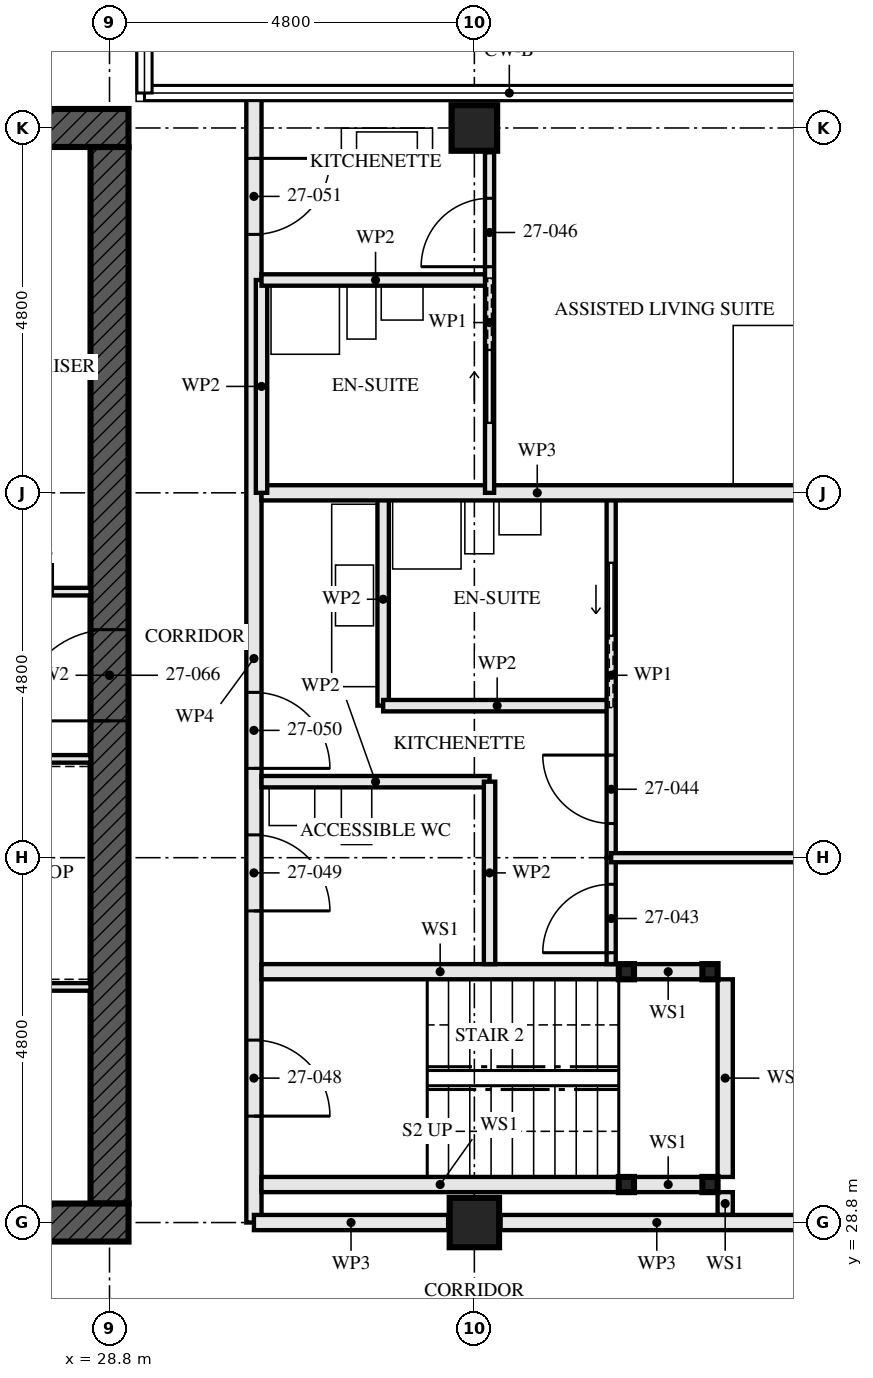
"""IFC4 building model, lengths in metres.
Left out: names, types, materials, properties, quantities, classifications, styles, units other than length and angle.
Written with IfcOpenShell. Run it as: python <this file> out.ifc"""

import sys

from ifc_helpers import new_model, si_unit, direction, frame, frame_2d, origin, origin_2d, place, context, subcontext, project, spatial, rectangle, hollow_rectangle, extrude, element, fill, save


model = new_model("IFC4")
c1 = context("Model", 3, precision=1e-05, world=origin(), true_north=direction((0.0, 1.0)))
c2 = subcontext(c1, "Body", "Model", "MODEL_VIEW")
j1 = project(units=[si_unit("LENGTHUNIT", "METRE"), si_unit("PLANEANGLEUNIT", "RADIAN")], contexts=[c1])
p1 = place(None, origin())
s1 = spatial("IfcSite", under=j1, at=p1, CompositionType="ELEMENT")
p2 = place(p1, origin())
s2 = spatial("IfcBuilding", under=s1, at=p2, CompositionType="ELEMENT")
p3 = place(p2, frame((0.0, 0.0, 101.5)))
s3 = spatial("IfcBuildingStorey", under=s2, at=p3, CompositionType="ELEMENT", Elevation=101.5)
p4 = place(p3, frame((33.6, 28.8, 0.0), z_axis=(0.0, 0.0, 1.0), x_axis=(0.0, 1.0, 0.0)))
e1 = element("IfcColumn", 1, at=p4, inside=s3, PredefinedType="COLUMN", context=c2, shape_type="SweptSolid", body=[
    extrude(hollow_rectangle(XDim=0.65, YDim=0.65, WallThickness=0.05, at=origin_2d()), origin(), (0.0, 0.0, 1.0), 3.5),
])
p5 = place(p3, frame((33.6, 43.2, 0.0), z_axis=(0.0, 0.0, 1.0), x_axis=(0.0, 1.0, 0.0)))
e2 = element("IfcColumn", 2, at=p5, inside=s3, PredefinedType="COLUMN", context=c2, shape_type="SweptSolid", body=[
    extrude(hollow_rectangle(XDim=0.6, YDim=0.6, WallThickness=0.08, at=origin_2d()), origin(), (0.0, 0.0, 1.0), 3.5),
])
p6 = place(p3, frame((14.15, 28.8, -0.17), z_axis=(0.0, 0.0, 1.0), x_axis=(1.0, 0.0, 0.0)))
e3 = element("IfcWall", 3, at=p6, inside=s3, PredefinedType="SHEAR", context=c2, shape_type="SweptSolid", body=[
    extrude(rectangle(XDim=14.9, YDim=0.5, at=frame_2d((7.45, 0.0))), origin(), (0.0, 0.0, 1.0), 3.5),
])
p7 = place(p6, frame((6.85, 0.0, 0.17)))
e4 = element("IfcOpeningElement", 4, at=p7, cuts=e3, PredefinedType="OPENING", context=c2, shape_type="SweptSolid", body=[
    extrude(rectangle(XDim=1.2, YDim=2.1, at=frame_2d((0.6, 1.05))), frame((0.0, 0.26, 0.0), z_axis=(0.0, -1.0, 0.0), x_axis=(1.0, 0.0, 0.0)), (0.0, 0.0, 1.0), 0.521),
])
p8 = place(p3, frame((29.05, 43.2, -0.17), z_axis=(0.0, 0.0, 1.0), x_axis=(-1.0, 0.0, 0.0)))
e5 = element("IfcWall", 5, at=p8, inside=s3, PredefinedType="SHEAR", context=c2, shape_type="SweptSolid", body=[
    extrude(rectangle(XDim=14.9, YDim=0.5, at=frame_2d((7.45, 0.0))), origin(), (0.0, 0.0, 1.0), 3.5),
])
p9 = place(p8, frame((6.85, 0.0, 0.17)))
e6 = element("IfcOpeningElement", 6, at=p9, cuts=e5, PredefinedType="OPENING", context=c2, shape_type="SweptSolid", body=[
    extrude(rectangle(XDim=1.2, YDim=2.1, at=frame_2d((0.6, 1.05))), frame((0.0, 0.26, 0.0), z_axis=(0.0, -1.0, 0.0), x_axis=(1.0, 0.0, 0.0)), (0.0, 0.0, 1.0), 0.521),
])
p10 = place(p3, frame((28.8, 29.05, -0.17), z_axis=(0.0, 0.0, 1.0), x_axis=(0.0, 1.0, 0.0)))
e7 = element("IfcWall", 7, at=p10, inside=s3, PredefinedType="SHEAR", context=c2, shape_type="SweptSolid", body=[
    extrude(rectangle(XDim=13.9, YDim=0.5, at=frame_2d((6.95, 0.0))), origin(), (0.0, 0.0, 1.0), 3.5),
])
p11 = place(p10, frame((6.35, 0.0, 0.17)))
e8 = element("IfcOpeningElement", 8, at=p11, cuts=e7, PredefinedType="OPENING", context=c2, shape_type="SweptSolid", body=[
    extrude(rectangle(XDim=1.2, YDim=2.1, at=frame_2d((0.6, 1.05))), frame((0.0, 0.26, 0.0), z_axis=(0.0, -1.0, 0.0), x_axis=(1.0, 0.0, 0.0)), (0.0, 0.0, 1.0), 0.521),
])
for number, where, z_axis, x_axis in (
    (9, (36.7, 29.3, 0.0), (0.0, 0.0, 1.0), (1.0, 0.0, 0.0)),
    (10, (36.7, 32.1, 0.0), (0.0, 0.0, 1.0), (1.0, 0.0, 0.0)),
    (11, (35.6, 29.3, 0.0), (0.0, 0.0, 1.0), (1.0, 0.0, 0.0)),
    (12, (35.6, 32.1, 0.0), (0.0, 0.0, 1.0), (1.0, 0.0, 0.0)),
):
    element("IfcColumn", number, at=place(p3, frame(where, z_axis=z_axis, x_axis=x_axis)), inside=s3, PredefinedType="COLUMN", context=c2, shape_type="SweptSolid", body=[
        extrude(hollow_rectangle(XDim=0.2, YDim=0.2, WallThickness=0.008, at=origin_2d()), origin(), (0.0, 0.0, 1.0), 3.33),
    ])
p12 = place(p3, frame((36.6, 29.3, 0.0), z_axis=(0.0, 0.0, 1.0), x_axis=(-1.0, 0.0, 0.0)))
e13 = element("IfcWall", 13, at=p12, inside=s3, PredefinedType="SOLIDWALL", context=c2, shape_type="SweptSolid", body=[
    extrude(rectangle(XDim=0.9, YDim=0.2, at=frame_2d((0.45, 0.0))), origin(), (0.0, 0.0, 1.0), 2.99),
])
p13 = place(p3, frame((35.5, 29.3, 0.0), z_axis=(0.0, 0.0, 1.0), x_axis=(-1.0, 0.0, 0.0)))
e14 = element("IfcWall", 14, at=p13, inside=s3, PredefinedType="SOLIDWALL", context=c2, shape_type="SweptSolid", body=[
    extrude(rectangle(XDim=4.7, YDim=0.2, at=frame_2d((2.35, 0.0))), origin(), (0.0, 0.0, 1.0), 2.99),
])
p14 = place(p3, frame((36.6, 32.1, 0.0), z_axis=(0.0, 0.0, 1.0), x_axis=(-1.0, 0.0, 0.0)))
e15 = element("IfcWall", 15, at=p14, inside=s3, PredefinedType="SOLIDWALL", context=c2, shape_type="SweptSolid", body=[
    extrude(rectangle(XDim=0.9, YDim=0.2, at=frame_2d((0.45, 0.0))), origin(), (0.0, 0.0, 1.0), 2.99),
])
p15 = place(p3, frame((35.5, 32.1, 0.0), z_axis=(0.0, 0.0, 1.0), x_axis=(-1.0, 0.0, 0.0)))
e16 = element("IfcWall", 16, at=p15, inside=s3, PredefinedType="SOLIDWALL", context=c2, shape_type="SweptSolid", body=[
    extrude(rectangle(XDim=4.7, YDim=0.2, at=frame_2d((2.35, 0.0))), origin(), (0.0, 0.0, 1.0), 2.99),
])
p16 = place(p3, frame((36.9, 28.9, 0.0), z_axis=(0.0, 0.0, 1.0), x_axis=(0.0, 1.0, 0.0)))
e17 = element("IfcWall", 17, at=p16, inside=s3, PredefinedType="SOLIDWALL", context=c2, shape_type="SweptSolid", body=[
    extrude(rectangle(XDim=0.3, YDim=0.2, at=frame_2d((0.15, 0.0))), origin(), (0.0, 0.0, 1.0), 3.33),
])
p17 = place(p3, frame((36.9, 29.4, 0.0), z_axis=(0.0, 0.0, 1.0), x_axis=(0.0, 1.0, 0.0)))
e18 = element("IfcWall", 18, at=p17, inside=s3, PredefinedType="SOLIDWALL", context=c2, shape_type="SweptSolid", body=[
    extrude(rectangle(XDim=2.6, YDim=0.2, at=frame_2d((1.3, 0.0))), origin(), (0.0, 0.0, 1.0), 3.33),
])
p18 = place(p3, frame((33.8, 32.2, 0.0), z_axis=(0.0, 0.0, 1.0), x_axis=(0.0, 1.0, 0.0)))
e19 = element("IfcWall", 19, at=p18, inside=s3, PredefinedType="PARTITIONING", context=c2, shape_type="SweptSolid", body=[
    extrude(rectangle(XDim=2.4, YDim=0.15, at=frame_2d((1.2, 0.0))), origin(), (0.0, 0.0, 1.0), 2.55),
])
for number, where, z_axis, x_axis in (
    (20, (33.8, 34.6, 0.0), (0.0, 0.0, 1.0), (-1.0, 0.0, 0.0)),
    (21, (35.4, 35.6, 0.0), (0.0, 0.0, 1.0), (-1.0, 0.0, 0.0)),
):
    element("IfcWall", number, at=place(p3, frame(where, z_axis=z_axis, x_axis=x_axis)), inside=s3, PredefinedType="PARTITIONING", context=c2, shape_type="SweptSolid", body=[
        extrude(rectangle(XDim=3.0, YDim=0.15, at=frame_2d((1.5, 0.0))), origin(), (0.0, 0.0, 1.0), 3.33),
    ])
p19 = place(p3, frame((32.4, 35.6, 0.0), z_axis=(0.0, 0.0, 1.0), x_axis=(0.0, 1.0, 0.0)))
e22 = element("IfcWall", 22, at=p19, inside=s3, PredefinedType="PARTITIONING", context=c2, shape_type="SweptSolid", body=[
    extrude(rectangle(XDim=2.8, YDim=0.15, at=frame_2d((1.4, 0.0))), origin(), (0.0, 0.0, 1.0), 3.33),
])
p20 = place(p3, frame((35.4, 32.2, 0.0), z_axis=(0.0, 0.0, 1.0), x_axis=(0.0, 1.0, 0.0)))
e23 = element("IfcWall", 23, at=p20, inside=s3, PredefinedType="PARTITIONING", context=c2, shape_type="SweptSolid", body=[
    extrude(rectangle(XDim=1.4, YDim=0.12, at=frame_2d((0.7, 0.0))), origin(), (0.0, 0.0, 1.0), 3.33),
])
p21 = place(p20, frame((0.15, 0.0, 0.0)))
e24 = element("IfcOpeningElement", 24, at=p21, cuts=e23, PredefinedType="OPENING", context=c2, shape_type="SweptSolid", body=[
    extrude(rectangle(XDim=0.9, YDim=2.1, at=frame_2d((0.45, 1.05))), frame((0.0, 0.071, 0.0), z_axis=(0.0, -1.0, 0.0), x_axis=(1.0, 0.0, 0.0)), (0.0, 0.0, 1.0), 0.141),
])
p22 = place(p3, frame((35.4, 33.6, 0.0), z_axis=(0.0, 0.0, 1.0), x_axis=(0.0, 1.0, 0.0)))
e25 = element("IfcWall", 25, at=p22, inside=s3, PredefinedType="PARTITIONING", context=c2, shape_type="SweptSolid", body=[
    extrude(rectangle(XDim=4.8, YDim=0.12, at=frame_2d((2.4, 0.0))), origin(), (0.0, 0.0, 1.0), 3.33),
])
p23 = place(p22, frame((0.45, 0.0, 0.0)))
e26 = element("IfcOpeningElement", 26, at=p23, cuts=e25, PredefinedType="OPENING", context=c2, shape_type="SweptSolid", body=[
    extrude(rectangle(XDim=0.9, YDim=2.1, at=frame_2d((0.45, 1.05))), frame((0.0, 0.071, 0.0), z_axis=(0.0, -1.0, 0.0), x_axis=(1.0, 0.0, 0.0)), (0.0, 0.0, 1.0), 0.141),
])
p24 = place(p22, frame((2.925, 0.0, 0.0)))
e27 = element("IfcOpeningElement", 27, at=p24, cuts=e25, PredefinedType="OPENING", context=c2, shape_type="SweptSolid", body=[
    extrude(rectangle(XDim=0.95, YDim=2.1, at=frame_2d((0.475, 1.05))), frame((0.0, 0.071, 0.0), z_axis=(0.0, -1.0, 0.0), x_axis=(1.0, 0.0, 0.0)), (0.0, 0.0, 1.0), 0.141),
])
p25 = place(p3, frame((42.855, 33.6, 0.0), z_axis=(0.0, 0.0, 1.0), x_axis=(-1.0, 0.0, 0.0)))
e28 = element("IfcWall", 28, at=p25, inside=s3, PredefinedType="PARTITIONING", context=c2, shape_type="SweptSolid", body=[
    extrude(rectangle(XDim=7.455, YDim=0.12, at=frame_2d((3.728, 0.0))), origin(), (0.0, 0.0, 1.0), 2.55),
])
p26 = place(p3, frame((38.055, 38.4, 0.0), z_axis=(0.0, 0.0, 1.0), x_axis=(-1.0, 0.0, 0.0)))
e29 = element("IfcWall", 29, at=p26, inside=s3, PredefinedType="PARTITIONING", context=c2, shape_type="SweptSolid", body=[
    extrude(rectangle(XDim=7.255, YDim=0.2, at=frame_2d((3.627, 0.0))), origin(), (0.0, 0.0, 1.0), 2.55),
])
p27 = place(p3, frame((33.8, 41.2, 0.0), z_axis=(0.0, 0.0, 1.0), x_axis=(-1.0, 0.0, 0.0)))
e30 = element("IfcWall", 30, at=p27, inside=s3, PredefinedType="PARTITIONING", context=c2, shape_type="SweptSolid", body=[
    extrude(rectangle(XDim=3.0, YDim=0.15, at=frame_2d((1.5, 0.0))), origin(), (0.0, 0.0, 1.0), 3.33),
])
p28 = place(p3, frame((30.8, 38.4, 0.0), z_axis=(0.0, 0.0, 1.0), x_axis=(0.0, 1.0, 0.0)))
e31 = element("IfcWall", 31, at=p28, inside=s3, PredefinedType="PARTITIONING", context=c2, shape_type="SweptSolid", body=[
    extrude(rectangle(XDim=2.8, YDim=0.15, at=frame_2d((1.4, 0.0))), origin(), (0.0, 0.0, 1.0), 3.33),
])
p29 = place(p3, frame((33.8, 38.4, 0.0), z_axis=(0.0, 0.0, 1.0), x_axis=(0.0, 1.0, 0.0)))
e32 = element("IfcWall", 32, at=p29, inside=s3, PredefinedType="PARTITIONING", context=c2, shape_type="SweptSolid", body=[
    extrude(rectangle(XDim=4.48, YDim=0.12, at=frame_2d((2.24, 0.0))), origin(), (0.0, 0.0, 1.0), 3.33),
])
p30 = place(p29, frame((2.975, 0.0, 0.0)))
e33 = element("IfcOpeningElement", 33, at=p30, cuts=e32, PredefinedType="OPENING", context=c2, shape_type="SweptSolid", body=[
    extrude(rectangle(XDim=0.9, YDim=2.1, at=frame_2d((0.45, 1.05))), frame((0.0, 0.071, 0.0), z_axis=(0.0, -1.0, 0.0), x_axis=(1.0, 0.0, 0.0)), (0.0, 0.0, 1.0), 0.141),
])
p31 = place(p29, frame((0.925, 0.0, 0.0)))
e34 = element("IfcOpeningElement", 34, at=p31, cuts=e32, PredefinedType="OPENING", context=c2, shape_type="SweptSolid", body=[
    extrude(rectangle(XDim=0.95, YDim=2.1, at=frame_2d((0.475, 1.05))), frame((0.0, 0.071, 0.0), z_axis=(0.0, -1.0, 0.0), x_axis=(1.0, 0.0, 0.0)), (0.0, 0.0, 1.0), 0.141),
])
p32 = place(p3, frame((30.7, 28.8, 0.0), z_axis=(0.0, 0.0, 1.0), x_axis=(0.0, 1.0, 0.0)))
e35 = element("IfcWall", 35, at=p32, inside=s3, PredefinedType="PARTITIONING", context=c2, shape_type="SweptSolid", body=[
    extrude(rectangle(XDim=14.84, YDim=0.2, at=frame_2d((7.42, 0.0))), origin(), (0.0, 0.0, 1.0), 2.32),
])
p33 = place(p32, frame((1.4, 0.0, 0.0)))
e36 = element("IfcOpeningElement", 36, at=p33, cuts=e35, PredefinedType="OPENING", context=c2, shape_type="SweptSolid", body=[
    extrude(rectangle(XDim=1.0, YDim=2.1, at=frame_2d((0.5, 1.05))), frame((0.0, 0.111, 0.0), z_axis=(0.0, -1.0, 0.0), x_axis=(1.0, 0.0, 0.0)), (0.0, 0.0, 1.0), 0.221),
])
p34 = place(p32, frame((4.1, 0.0, 0.0)))
e37 = element("IfcOpeningElement", 37, at=p34, cuts=e35, PredefinedType="OPENING", context=c2, shape_type="SweptSolid", body=[
    extrude(rectangle(XDim=1.0, YDim=2.1, at=frame_2d((0.5, 1.05))), frame((0.0, 0.111, 0.0), z_axis=(0.0, -1.0, 0.0), x_axis=(1.0, 0.0, 0.0)), (0.0, 0.0, 1.0), 0.221),
])
p35 = place(p32, frame((5.975, 0.0, 0.0)))
e38 = element("IfcOpeningElement", 38, at=p35, cuts=e35, PredefinedType="OPENING", context=c2, shape_type="SweptSolid", body=[
    extrude(rectangle(XDim=1.0, YDim=2.1, at=frame_2d((0.5, 1.05))), frame((0.0, 0.111, 0.0), z_axis=(0.0, -1.0, 0.0), x_axis=(1.0, 0.0, 0.0)), (0.0, 0.0, 1.0), 0.221),
])
p36 = place(p32, frame((13.0, 0.0, 0.0)))
e39 = element("IfcOpeningElement", 39, at=p36, cuts=e35, PredefinedType="OPENING", context=c2, shape_type="SweptSolid", body=[
    extrude(rectangle(XDim=1.0, YDim=2.1, at=frame_2d((0.5, 1.05))), frame((0.0, 0.111, 0.0), z_axis=(0.0, -1.0, 0.0), x_axis=(1.0, 0.0, 0.0)), (0.0, 0.0, 1.0), 0.221),
])
p37 = place(p3, frame((23.05, 34.9, 0.0), z_axis=(0.0, 0.0, 1.0), x_axis=(1.0, 0.0, 0.0)))
e40 = element("IfcWall", 40, at=p37, inside=s3, PredefinedType="SOLIDWALL", context=c2, shape_type="SweptSolid", body=[
    extrude(rectangle(XDim=5.5, YDim=0.1, at=frame_2d((2.75, 0.0))), origin(), (0.0, 0.0, 1.0), 3.33),
])
p38 = place(p3, frame((22.65, 37.1, 0.0), z_axis=(0.0, 0.0, 1.0), x_axis=(1.0, 0.0, 0.0)))
e41 = element("IfcWall", 41, at=p38, inside=s3, PredefinedType="SOLIDWALL", context=c2, shape_type="SweptSolid", body=[
    extrude(rectangle(XDim=5.9, YDim=0.1, at=frame_2d((2.95, 0.0))), origin(), (0.0, 0.0, 1.0), 3.33),
])
p39 = place(p38, frame((3.15, 0.0, 0.0)))
e42 = element("IfcOpeningElement", 42, at=p39, cuts=e41, PredefinedType="OPENING", context=c2, shape_type="SweptSolid", body=[
    extrude(rectangle(XDim=0.9, YDim=2.1, at=frame_2d((0.45, 1.05))), frame((0.0, 0.061, 0.0), z_axis=(0.0, -1.0, 0.0), x_axis=(1.0, 0.0, 0.0)), (0.0, 0.0, 1.0), 0.121),
])
p40 = place(p38, frame((4.7, 0.0, 0.0)))
e43 = element("IfcOpeningElement", 43, at=p40, cuts=e41, PredefinedType="OPENING", context=c2, shape_type="SweptSolid", body=[
    extrude(rectangle(XDim=0.7, YDim=2.1, at=frame_2d((0.35, 1.05))), frame((0.0, 0.061, 0.0), z_axis=(0.0, -1.0, 0.0), x_axis=(1.0, 0.0, 0.0)), (0.0, 0.0, 1.0), 0.121),
])
p41 = place(p3, frame((23.15, 31.9, 0.0), z_axis=(0.0, 0.0, 1.0), x_axis=(1.0, 0.0, 0.0)))
e44 = element("IfcWall", 44, at=p41, inside=s3, PredefinedType="SOLIDWALL", context=c2, shape_type="SweptSolid", body=[
    extrude(rectangle(XDim=5.4, YDim=0.1, at=frame_2d((2.7, 0.0))), origin(), (0.0, 0.0, 1.0), 3.33),
])
p42 = place(p3, frame((38.055, 28.8, 0.0), z_axis=(0.0, 0.0, 1.0), x_axis=(-1.0, 0.0, 0.0)))
e45 = element("IfcWall", 45, at=p42, inside=s3, PredefinedType="PARTITIONING", context=c2, shape_type="SweptSolid", body=[
    extrude(rectangle(XDim=4.11, YDim=0.2, at=frame_2d((2.055, 0.0))), origin(), (0.0, 0.0, 1.0), 2.32),
])
p43 = place(p3, frame((33.255, 28.8, 0.0), z_axis=(0.0, 0.0, 1.0), x_axis=(-1.0, 0.0, 0.0)))
e46 = element("IfcWall", 46, at=p43, inside=s3, PredefinedType="PARTITIONING", context=c2, shape_type="SweptSolid", body=[
    extrude(rectangle(XDim=2.555, YDim=0.2, at=frame_2d((1.277, 0.0))), origin(), (0.0, 0.0, 1.0), 2.32),
])
p44 = place(p21, origin())
e47 = element("IfcDoor", 47, at=p44, inside=s3, OperationType="SINGLE_SWING_RIGHT", PredefinedType="DOOR", context=c2, shape_type="SweptSolid", body=[
    extrude(rectangle(XDim=0.9, YDim=2.1, at=frame_2d((0.45, 1.05))), frame((0.0, 0.022, 0.0), z_axis=(0.0, -1.0, 0.0), x_axis=(1.0, 0.0, 0.0)), (0.0, 0.0, 1.0), 0.044),
])
fill(e24, e47)
p45 = place(p23, origin())
e48 = element("IfcDoor", 48, at=p45, inside=s3, OperationType="SINGLE_SWING_LEFT", PredefinedType="DOOR", context=c2, shape_type="SweptSolid", body=[
    extrude(rectangle(XDim=0.9, YDim=2.1, at=frame_2d((0.45, 1.05))), frame((0.0, 0.022, 0.0), z_axis=(0.0, -1.0, 0.0), x_axis=(1.0, 0.0, 0.0)), (0.0, 0.0, 1.0), 0.044),
])
fill(e26, e48)
p46 = place(p24, origin())
e49 = element("IfcDoor", 49, at=p46, inside=s3, OperationType="SLIDING_TO_RIGHT", PredefinedType="DOOR", context=c2, shape_type="SweptSolid", body=[
    extrude(rectangle(XDim=0.95, YDim=2.1, at=frame_2d((0.475, 1.05))), frame((0.0, 0.022, 0.0), z_axis=(0.0, -1.0, 0.0), x_axis=(1.0, 0.0, 0.0)), (0.0, 0.0, 1.0), 0.044),
])
fill(e27, e49)
p47 = place(p30, origin())
e50 = element("IfcDoor", 50, at=p47, inside=s3, OperationType="SINGLE_SWING_RIGHT", PredefinedType="DOOR", context=c2, shape_type="SweptSolid", body=[
    extrude(rectangle(XDim=0.9, YDim=2.1, at=frame_2d((0.45, 1.05))), frame((0.0, 0.022, 0.0), z_axis=(0.0, -1.0, 0.0), x_axis=(1.0, 0.0, 0.0)), (0.0, 0.0, 1.0), 0.044),
])
fill(e33, e50)
p48 = place(p31, origin())
e51 = element("IfcDoor", 51, at=p48, inside=s3, OperationType="SLIDING_TO_LEFT", PredefinedType="DOOR", context=c2, shape_type="SweptSolid", body=[
    extrude(rectangle(XDim=0.95, YDim=2.1, at=frame_2d((0.475, 1.05))), frame((0.0, 0.022, 0.0), z_axis=(0.0, -1.0, 0.0), x_axis=(1.0, 0.0, 0.0)), (0.0, 0.0, 1.0), 0.044),
])
fill(e34, e51)
p49 = place(p33, frame((1.0, 0.0, 0.0), z_axis=(0.0, 0.0, 1.0), x_axis=(-1.0, 0.0, 0.0)))
e52 = element("IfcDoor", 52, at=p49, inside=s3, OperationType="SINGLE_SWING_LEFT", PredefinedType="DOOR", context=c2, shape_type="SweptSolid", body=[
    extrude(rectangle(XDim=1.0, YDim=2.1, at=frame_2d((0.5, 1.05))), frame((0.0, 0.032, 0.0), z_axis=(0.0, -1.0, 0.0), x_axis=(1.0, 0.0, 0.0)), (0.0, 0.0, 1.0), 0.064),
])
fill(e36, e52)
p50 = place(p34, frame((1.0, 0.0, 0.0), z_axis=(0.0, 0.0, 1.0), x_axis=(-1.0, 0.0, 0.0)))
e53 = element("IfcDoor", 53, at=p50, inside=s3, OperationType="SINGLE_SWING_LEFT", PredefinedType="DOOR", context=c2, shape_type="SweptSolid", body=[
    extrude(rectangle(XDim=1.0, YDim=2.1, at=frame_2d((0.5, 1.05))), frame((0.0, 0.027, 0.0), z_axis=(0.0, -1.0, 0.0), x_axis=(1.0, 0.0, 0.0)), (0.0, 0.0, 1.0), 0.054),
])
fill(e37, e53)
p51 = place(p35, frame((1.0, 0.0, 0.0), z_axis=(0.0, 0.0, 1.0), x_axis=(-1.0, 0.0, 0.0)))
e54 = element("IfcDoor", 54, at=p51, inside=s3, OperationType="SINGLE_SWING_LEFT", PredefinedType="DOOR", context=c2, shape_type="SweptSolid", body=[
    extrude(rectangle(XDim=1.0, YDim=2.1, at=frame_2d((0.5, 1.05))), frame((0.0, 0.027, 0.0), z_axis=(0.0, -1.0, 0.0), x_axis=(1.0, 0.0, 0.0)), (0.0, 0.0, 1.0), 0.054),
])
fill(e38, e54)
p52 = place(p36, frame((1.0, 0.0, 0.0), z_axis=(0.0, 0.0, 1.0), x_axis=(-1.0, 0.0, 0.0)))
e55 = element("IfcDoor", 55, at=p52, inside=s3, OperationType="SINGLE_SWING_RIGHT", PredefinedType="DOOR", context=c2, shape_type="SweptSolid", body=[
    extrude(rectangle(XDim=1.0, YDim=2.1, at=frame_2d((0.5, 1.05))), frame((0.0, 0.027, 0.0), z_axis=(0.0, -1.0, 0.0), x_axis=(1.0, 0.0, 0.0)), (0.0, 0.0, 1.0), 0.054),
])
fill(e39, e55)
p53 = place(p11, origin())
e56 = element("IfcDoor", 56, at=p53, inside=s3, OperationType="SINGLE_SWING_LEFT", PredefinedType="DOOR", context=c2, shape_type="SweptSolid", body=[
    extrude(rectangle(XDim=1.2, YDim=2.1, at=frame_2d((0.6, 1.05))), frame((0.0, 0.027, 0.0), z_axis=(0.0, -1.0, 0.0), x_axis=(1.0, 0.0, 0.0)), (0.0, 0.0, 1.0), 0.054),
])
fill(e8, e56)
save(model, sys.argv[1])
